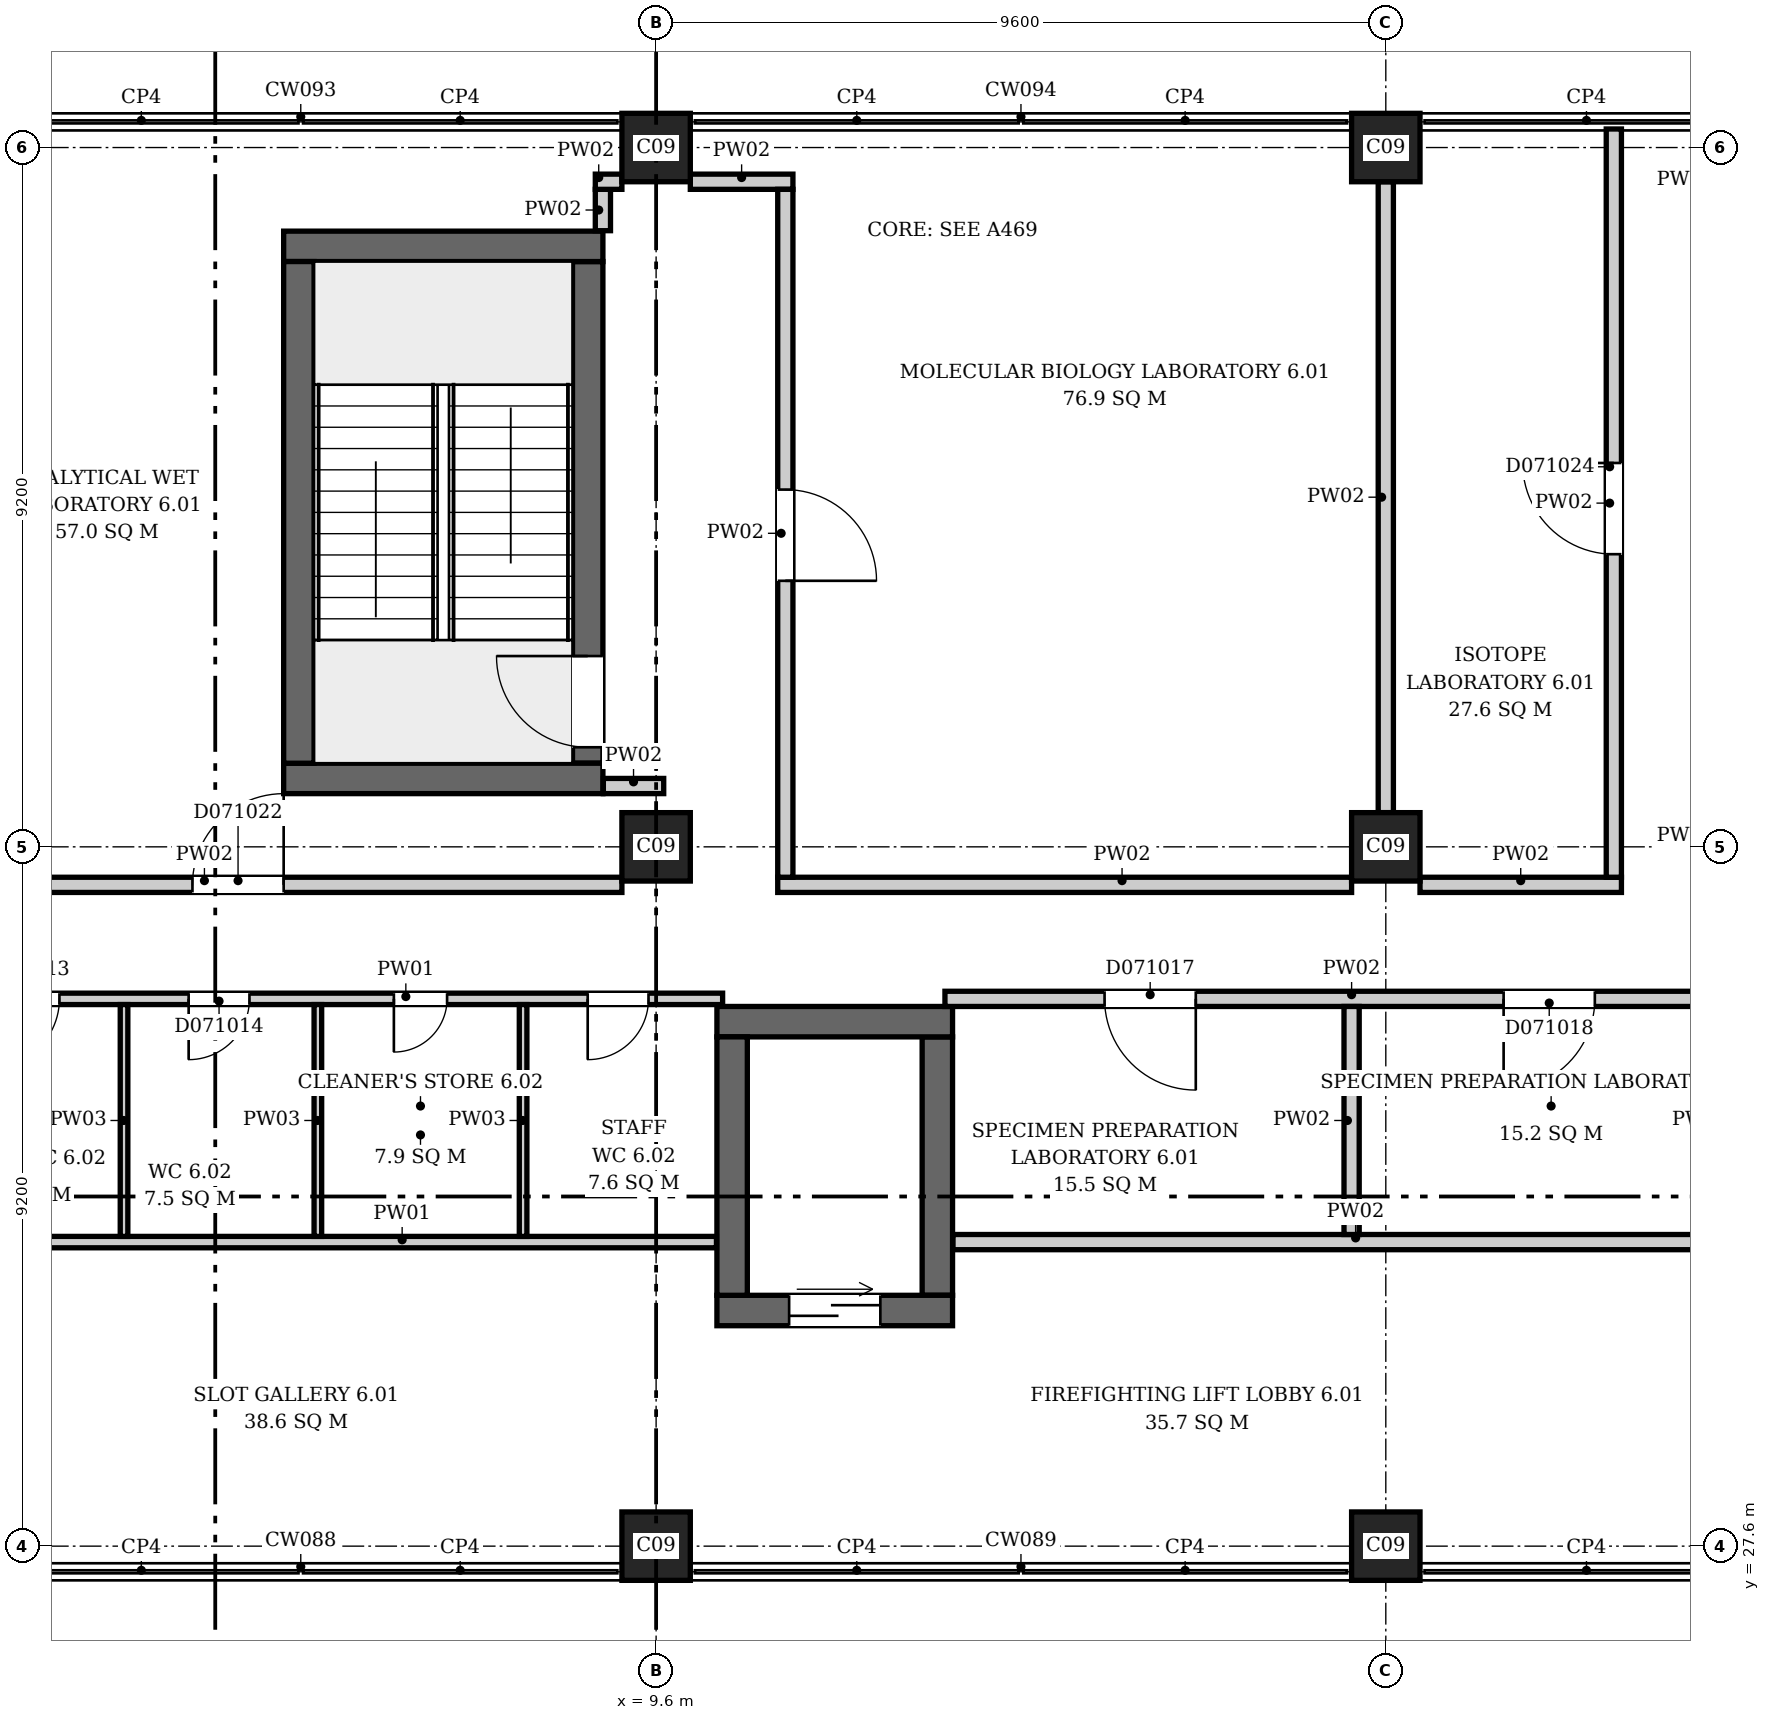
"""IFC4 building model, lengths in metres.
Left out: names, types, materials, properties, quantities, classifications, styles, units other than length and angle.
Written with IfcOpenShell. Run it as: python <this file> out.ifc"""

import sys

from ifc_helpers import new_model, si_unit, direction, frame, frame_2d, origin, origin_2d, place, context, subcontext, project, spatial, rectangle, extrude, element, fill, save


model = new_model("IFC4")
c1 = context("Model", 3, precision=1e-05, world=origin(), true_north=direction((0.0, 1.0)))
c2 = subcontext(c1, "Body", "Model", "MODEL_VIEW")
j1 = project(units=[si_unit("LENGTHUNIT", "METRE"), si_unit("PLANEANGLEUNIT", "RADIAN")], contexts=[c1])
p1 = place(None, origin())
s1 = spatial("IfcSite", under=j1, at=p1, CompositionType="ELEMENT")
p2 = place(p1, origin())
s2 = spatial("IfcBuilding", under=s1, at=p2, CompositionType="ELEMENT")
p3 = place(p2, frame((0.0, 0.0, 36.1)))
s3 = spatial("IfcBuildingStorey", under=s2, at=p3, CompositionType="ELEMENT", Elevation=36.1)
for number, where, z_axis, x_axis in (
    (1, (4.7, 37.7, 0.0), (0.0, 0.0, 1.0), (1.0, 0.0, 0.0)),
    (2, (4.7, 44.7, 0.0), (0.0, 0.0, 1.0), (1.0, 0.0, 0.0)),
):
    element("IfcWall", number, at=place(p3, frame(where, z_axis=z_axis, x_axis=x_axis)), inside=s3, PredefinedType="SHEAR", context=c2, shape_type="SweptSolid", body=[
        extrude(rectangle(XDim=4.2, YDim=0.4, at=frame_2d((2.1, 0.0))), origin(), (0.0, 0.0, 1.0), 4.2),
    ])
p4 = place(p3, frame((4.9, 37.9, 0.0), z_axis=(0.0, 0.0, 1.0), x_axis=(0.0, 1.0, 0.0)))
e3 = element("IfcWall", 3, at=p4, inside=s3, PredefinedType="SHEAR", context=c2, shape_type="SweptSolid", body=[
    extrude(rectangle(XDim=6.6, YDim=0.4, at=frame_2d((3.3, 0.0))), origin(), (0.0, 0.0, 1.0), 4.2),
])
p5 = place(p3, frame((8.7, 37.9, 0.0), z_axis=(0.0, 0.0, 1.0), x_axis=(0.0, 1.0, 0.0)))
e4 = element("IfcWall", 4, at=p5, inside=s3, PredefinedType="SHEAR", context=c2, shape_type="SweptSolid", body=[
    extrude(rectangle(XDim=6.6, YDim=0.4, at=frame_2d((3.3, 0.0))), origin(), (0.0, 0.0, 1.0), 4.2),
])
p6 = place(p5, frame((0.21, 0.0, 0.0)))
e5 = element("IfcOpeningElement", 5, at=p6, cuts=e4, PredefinedType="OPENING", context=c2, shape_type="SweptSolid", body=[
    extrude(rectangle(XDim=1.2, YDim=2.1, at=frame_2d((0.6, 1.05))), frame((0.0, 0.21, 0.0), z_axis=(0.0, -1.0, 0.0), x_axis=(1.0, 0.0, 0.0)), (0.0, 0.0, 1.0), 0.42),
])
p7 = place(p3, frame((10.4, 30.7, 0.0), z_axis=(0.0, 0.0, 1.0), x_axis=(1.0, 0.0, 0.0)))
e6 = element("IfcWall", 6, at=p7, inside=s3, PredefinedType="SHEAR", context=c2, shape_type="SweptSolid", body=[
    extrude(rectangle(XDim=3.1, YDim=0.4, at=frame_2d((1.55, 0.0))), origin(), (0.0, 0.0, 1.0), 4.2),
])
p8 = place(p7, frame((0.95, 0.0, 0.0)))
e7 = element("IfcOpeningElement", 7, at=p8, cuts=e6, PredefinedType="OPENING", context=c2, shape_type="SweptSolid", body=[
    extrude(rectangle(XDim=1.2, YDim=2.1, at=frame_2d((0.6, 1.05))), frame((0.0, 0.21, 0.0), z_axis=(0.0, -1.0, 0.0), x_axis=(1.0, 0.0, 0.0)), (0.0, 0.0, 1.0), 0.42),
])
p9 = place(p3, frame((10.4, 34.5, 0.0), z_axis=(0.0, 0.0, 1.0), x_axis=(1.0, 0.0, 0.0)))
e8 = element("IfcWall", 8, at=p9, inside=s3, PredefinedType="SHEAR", context=c2, shape_type="SweptSolid", body=[
    extrude(rectangle(XDim=3.1, YDim=0.4, at=frame_2d((1.55, 0.0))), origin(), (0.0, 0.0, 1.0), 4.2),
])
for number, where, z_axis, x_axis in (
    (9, (10.6, 30.9, 0.0), (0.0, 0.0, 1.0), (0.0, 1.0, 0.0)),
    (10, (13.3, 30.9, 0.0), (0.0, 0.0, 1.0), (0.0, 1.0, 0.0)),
):
    element("IfcWall", number, at=place(p3, frame(where, z_axis=z_axis, x_axis=x_axis)), inside=s3, PredefinedType="SHEAR", context=c2, shape_type="SweptSolid", body=[
        extrude(rectangle(XDim=3.4, YDim=0.4, at=frame_2d((1.7, 0.0))), origin(), (0.0, 0.0, 1.0), 4.2),
    ])
for number, where, z_axis, x_axis in (
    (11, (9.6, 27.6, 0.0), (0.0, 0.0, 1.0), (1.0, 0.0, 0.0)),
    (12, (19.2, 27.6, 0.0), (0.0, 0.0, 1.0), (1.0, 0.0, 0.0)),
    (13, (9.6, 36.8, 0.0), (0.0, 0.0, 1.0), (1.0, 0.0, 0.0)),
    (14, (19.2, 36.8, 0.0), (0.0, 0.0, 1.0), (1.0, 0.0, 0.0)),
    (15, (9.6, 46.0, 0.0), (0.0, 0.0, 1.0), (1.0, 0.0, 0.0)),
    (16, (19.2, 46.0, 0.0), (0.0, 0.0, 1.0), (1.0, 0.0, 0.0)),
):
    element("IfcColumn", number, at=place(p3, frame(where, z_axis=z_axis, x_axis=x_axis)), inside=s3, PredefinedType="COLUMN", context=c2, shape_type="SweptSolid", body=[
        extrude(rectangle(XDim=0.9, YDim=0.9, at=origin_2d()), origin(), (0.0, 0.0, 1.0), 4.2),
    ])
p10 = place(p3, frame((0.056, 31.6, 0.0), z_axis=(0.0, 0.0, 1.0), x_axis=(1.0, 0.0, 0.0)))
e17 = element("IfcWall", 17, at=p10, inside=s3, PredefinedType="PARTITIONING", context=c2, shape_type="SweptSolid", body=[
    extrude(rectangle(XDim=10.338, YDim=0.15, at=frame_2d((5.169, 0.0))), origin(), (0.0, 0.0, 1.0), 3.9),
])
p11 = place(p3, frame((0.056, 34.8, 0.0), z_axis=(0.0, 0.0, 1.0), x_axis=(1.0, 0.0, 0.0)))
e18 = element("IfcWall", 18, at=p11, inside=s3, PredefinedType="PARTITIONING", context=c2, shape_type="SweptSolid", body=[
    extrude(rectangle(XDim=10.419, YDim=0.15, at=frame_2d((5.209, 0.0))), origin(), (0.0, 0.0, 1.0), 3.9),
])
p12 = place(p11, frame((0.794, 0.0, 0.0)))
e19 = element("IfcOpeningElement", 19, at=p12, cuts=e18, PredefinedType="OPENING", context=c2, shape_type="SweptSolid", body=[
    extrude(rectangle(XDim=0.9, YDim=2.1, at=frame_2d((0.45, 1.05))), frame((0.0, 0.085, 0.0), z_axis=(0.0, -1.0, 0.0), x_axis=(1.0, 0.0, 0.0)), (0.0, 0.0, 1.0), 0.17),
])
p13 = place(p11, frame((3.394, 0.0, 0.0)))
e20 = element("IfcOpeningElement", 20, at=p13, cuts=e18, PredefinedType="OPENING", context=c2, shape_type="SweptSolid", body=[
    extrude(rectangle(XDim=0.8, YDim=2.1, at=frame_2d((0.4, 1.05))), frame((0.0, 0.085, 0.0), z_axis=(0.0, -1.0, 0.0), x_axis=(1.0, 0.0, 0.0)), (0.0, 0.0, 1.0), 0.17),
])
p14 = place(p11, frame((6.094, 0.0, 0.0)))
e21 = element("IfcOpeningElement", 21, at=p14, cuts=e18, PredefinedType="OPENING", context=c2, shape_type="SweptSolid", body=[
    extrude(rectangle(XDim=0.7, YDim=2.1, at=frame_2d((0.35, 1.05))), frame((0.0, 0.085, 0.0), z_axis=(0.0, -1.0, 0.0), x_axis=(1.0, 0.0, 0.0)), (0.0, 0.0, 1.0), 0.17),
])
p15 = place(p11, frame((8.644, 0.0, 0.0)))
e22 = element("IfcOpeningElement", 22, at=p15, cuts=e18, PredefinedType="OPENING", context=c2, shape_type="SweptSolid", body=[
    extrude(rectangle(XDim=0.8, YDim=2.1, at=frame_2d((0.4, 1.05))), frame((0.0, 0.085, 0.0), z_axis=(0.0, -1.0, 0.0), x_axis=(1.0, 0.0, 0.0)), (0.0, 0.0, 1.0), 0.17),
])
p16 = place(p3, frame((0.7, 36.3, 0.0), z_axis=(0.0, 0.0, 1.0), x_axis=(1.0, 0.0, 0.0)))
e23 = element("IfcWall", 23, at=p16, inside=s3, PredefinedType="PARTITIONING", context=c2, shape_type="SweptSolid", body=[
    extrude(rectangle(XDim=8.45, YDim=0.2, at=frame_2d((4.225, 0.0))), origin(), (0.0, 0.0, 1.0), 3.9),
])
p17 = place(p16, frame((2.8, 0.0, 0.0)))
e24 = element("IfcOpeningElement", 24, at=p17, cuts=e23, PredefinedType="OPENING", context=c2, shape_type="SweptSolid", body=[
    extrude(rectangle(XDim=1.2, YDim=2.1, at=frame_2d((0.6, 1.05))), frame((0.0, 0.11, 0.0), z_axis=(0.0, -1.0, 0.0), x_axis=(1.0, 0.0, 0.0)), (0.0, 0.0, 1.0), 0.22),
])
for number, where, z_axis, x_axis in (
    (25, (2.6, 31.675, 0.0), (0.0, 0.0, 1.0), (0.0, 1.0, 0.0)),
    (26, (5.15, 31.675, 0.0), (0.0, 0.0, 1.0), (0.0, 1.0, 0.0)),
    (27, (7.85, 31.675, 0.0), (0.0, 0.0, 1.0), (0.0, 1.0, 0.0)),
):
    element("IfcWall", number, at=place(p3, frame(where, z_axis=z_axis, x_axis=x_axis)), inside=s3, PredefinedType="PARTITIONING", context=c2, shape_type="SweptSolid", body=[
        extrude(rectangle(XDim=3.05, YDim=0.1, at=frame_2d((1.525, 0.0))), origin(), (0.0, 0.0, 1.0), 3.9),
    ])
p18 = place(p3, frame((8.9, 44.906, 0.0), z_axis=(0.0, 0.0, 1.0), x_axis=(0.0, 1.0, 0.0)))
e28 = element("IfcWall", 28, at=p18, inside=s3, PredefinedType="PARTITIONING", context=c2, shape_type="SweptSolid", body=[
    extrude(rectangle(XDim=0.544, YDim=0.2, at=frame_2d((0.272, 0.0))), origin(), (0.0, 0.0, 1.0), 3.9),
])
p19 = place(p3, frame((8.8, 45.55, 0.0), z_axis=(0.0, 0.0, 1.0), x_axis=(1.0, 0.0, 0.0)))
e29 = element("IfcWall", 29, at=p19, inside=s3, PredefinedType="PARTITIONING", context=c2, shape_type="SweptSolid", body=[
    extrude(rectangle(XDim=0.35, YDim=0.2, at=frame_2d((0.175, 0.0))), origin(), (0.0, 0.0, 1.0), 3.9),
])
p20 = place(p3, frame((8.906, 37.6, 0.0), z_axis=(0.0, 0.0, 1.0), x_axis=(1.0, 0.0, 0.0)))
e30 = element("IfcWall", 30, at=p20, inside=s3, PredefinedType="PARTITIONING", context=c2, shape_type="SweptSolid", body=[
    extrude(rectangle(XDim=0.794, YDim=0.2, at=frame_2d((0.397, 0.0))), origin(), (0.0, 0.0, 1.0), 3.9),
])
p21 = place(p3, frame((10.05, 45.55, 0.0), z_axis=(0.0, 0.0, 1.0), x_axis=(1.0, 0.0, 0.0)))
e31 = element("IfcWall", 31, at=p21, inside=s3, PredefinedType="PARTITIONING", context=c2, shape_type="SweptSolid", body=[
    extrude(rectangle(XDim=1.35, YDim=0.2, at=frame_2d((0.675, 0.0))), origin(), (0.0, 0.0, 1.0), 3.9),
])
p22 = place(p3, frame((11.2, 36.3, 0.0), z_axis=(0.0, 0.0, 1.0), x_axis=(1.0, 0.0, 0.0)))
e32 = element("IfcWall", 32, at=p22, inside=s3, PredefinedType="PARTITIONING", context=c2, shape_type="SweptSolid", body=[
    extrude(rectangle(XDim=7.55, YDim=0.2, at=frame_2d((3.775, 0.0))), origin(), (0.0, 0.0, 1.0), 3.9),
])
p23 = place(p3, frame((11.3, 36.4, 0.0), z_axis=(0.0, 0.0, 1.0), x_axis=(0.0, 1.0, 0.0)))
e33 = element("IfcWall", 33, at=p23, inside=s3, PredefinedType="PARTITIONING", context=c2, shape_type="SweptSolid", body=[
    extrude(rectangle(XDim=9.05, YDim=0.2, at=frame_2d((4.525, 0.0))), origin(), (0.0, 0.0, 1.0), 3.9),
])
p24 = place(p23, frame((3.9, 0.0, 0.0)))
e34 = element("IfcOpeningElement", 34, at=p24, cuts=e33, PredefinedType="OPENING", context=c2, shape_type="SweptSolid", body=[
    extrude(rectangle(XDim=1.2, YDim=2.1, at=frame_2d((0.6, 1.05))), frame((0.0, 0.11, 0.0), z_axis=(0.0, -1.0, 0.0), x_axis=(1.0, 0.0, 0.0)), (0.0, 0.0, 1.0), 0.22),
])
p25 = place(p3, frame((13.4, 34.8, 0.0), z_axis=(0.0, 0.0, 1.0), x_axis=(1.0, 0.0, 0.0)))
e35 = element("IfcWall", 35, at=p25, inside=s3, PredefinedType="PARTITIONING", context=c2, shape_type="SweptSolid", body=[
    extrude(rectangle(XDim=10.7, YDim=0.2, at=frame_2d((5.35, 0.0))), origin(), (0.0, 0.0, 1.0), 3.9),
])
p26 = place(p25, frame((2.1, 0.0, 0.0)))
e36 = element("IfcOpeningElement", 36, at=p26, cuts=e35, PredefinedType="OPENING", context=c2, shape_type="SweptSolid", body=[
    extrude(rectangle(XDim=1.2, YDim=2.1, at=frame_2d((0.6, 1.05))), frame((0.0, 0.11, 0.0), z_axis=(0.0, -1.0, 0.0), x_axis=(1.0, 0.0, 0.0)), (0.0, 0.0, 1.0), 0.22),
])
p27 = place(p25, frame((7.35, 0.0, 0.0)))
e37 = element("IfcOpeningElement", 37, at=p27, cuts=e35, PredefinedType="OPENING", context=c2, shape_type="SweptSolid", body=[
    extrude(rectangle(XDim=1.2, YDim=2.1, at=frame_2d((0.6, 1.05))), frame((0.0, 0.11, 0.0), z_axis=(0.0, -1.0, 0.0), x_axis=(1.0, 0.0, 0.0)), (0.0, 0.0, 1.0), 0.22),
])
p28 = place(p3, frame((13.506, 31.6, 0.0), z_axis=(0.0, 0.0, 1.0), x_axis=(1.0, 0.0, 0.0)))
e38 = element("IfcWall", 38, at=p28, inside=s3, PredefinedType="PARTITIONING", context=c2, shape_type="SweptSolid", body=[
    extrude(rectangle(XDim=10.594, YDim=0.2, at=frame_2d((5.297, 0.0))), origin(), (0.0, 0.0, 1.0), 3.9),
])
p29 = place(p3, frame((18.75, 31.7, 0.0), z_axis=(0.0, 0.0, 1.0), x_axis=(0.0, 1.0, 0.0)))
e39 = element("IfcWall", 39, at=p29, inside=s3, PredefinedType="PARTITIONING", context=c2, shape_type="SweptSolid", body=[
    extrude(rectangle(XDim=3.0, YDim=0.2, at=frame_2d((1.5, 0.0))), origin(), (0.0, 0.0, 1.0), 3.9),
])
p30 = place(p3, frame((19.2, 37.25, 0.0), z_axis=(0.0, 0.0, 1.0), x_axis=(0.0, 1.0, 0.0)))
e40 = element("IfcWall", 40, at=p30, inside=s3, PredefinedType="PARTITIONING", context=c2, shape_type="SweptSolid", body=[
    extrude(rectangle(XDim=8.3, YDim=0.2, at=frame_2d((4.15, 0.0))), origin(), (0.0, 0.0, 1.0), 3.9),
])
p31 = place(p3, frame((19.65, 36.3, 0.0), z_axis=(0.0, 0.0, 1.0), x_axis=(1.0, 0.0, 0.0)))
e41 = element("IfcWall", 41, at=p31, inside=s3, PredefinedType="PARTITIONING", context=c2, shape_type="SweptSolid", body=[
    extrude(rectangle(XDim=2.65, YDim=0.2, at=frame_2d((1.325, 0.0))), origin(), (0.0, 0.0, 1.0), 3.9),
])
p32 = place(p3, frame((22.2, 36.4, 0.0), z_axis=(0.0, 0.0, 1.0), x_axis=(0.0, 1.0, 0.0)))
e42 = element("IfcWall", 42, at=p32, inside=s3, PredefinedType="PARTITIONING", context=c2, shape_type="SweptSolid", body=[
    extrude(rectangle(XDim=9.844, YDim=0.2, at=frame_2d((4.922, 0.0))), origin(), (0.0, 0.0, 1.0), 3.9),
])
p33 = place(p32, frame((4.25, 0.0, 0.0)))
e43 = element("IfcOpeningElement", 43, at=p33, cuts=e42, PredefinedType="OPENING", context=c2, shape_type="SweptSolid", body=[
    extrude(rectangle(XDim=1.2, YDim=2.1, at=frame_2d((0.6, 1.05))), frame((0.0, 0.11, 0.0), z_axis=(0.0, -1.0, 0.0), x_axis=(1.0, 0.0, 0.0)), (0.0, 0.0, 1.0), 0.22),
])
p34 = place(p6, origin())
e44 = element("IfcDoor", 44, at=p34, inside=s3, OperationType="SINGLE_SWING_RIGHT", PredefinedType="DOOR", context=c2, shape_type="SweptSolid", body=[
    extrude(rectangle(XDim=1.2, YDim=2.1, at=frame_2d((0.6, 1.05))), frame((0.0, 0.025, 0.0), z_axis=(0.0, -1.0, 0.0), x_axis=(1.0, 0.0, 0.0)), (0.0, 0.0, 1.0), 0.05),
])
fill(e5, e44)
p35 = place(p8, origin())
e45 = element("IfcDoor", 45, at=p35, inside=s3, OperationType="DOUBLE_DOOR_SLIDING", PredefinedType="DOOR", context=c2, shape_type="SweptSolid", body=[
    extrude(rectangle(XDim=1.2, YDim=2.1, at=frame_2d((0.6, 1.05))), frame((0.0, 0.025, 0.0), z_axis=(0.0, -1.0, 0.0), x_axis=(1.0, 0.0, 0.0)), (0.0, 0.0, 1.0), 0.05),
])
fill(e7, e45)
p36 = place(p12, origin())
e46 = element("IfcDoor", 46, at=p36, inside=s3, OperationType="SINGLE_SWING_LEFT", PredefinedType="DOOR", context=c2, shape_type="SweptSolid", body=[
    extrude(rectangle(XDim=0.9, YDim=2.1, at=frame_2d((0.45, 1.05))), frame((0.0, 0.025, 0.0), z_axis=(0.0, -1.0, 0.0), x_axis=(1.0, 0.0, 0.0)), (0.0, 0.0, 1.0), 0.05),
])
fill(e19, e46)
p37 = place(p13, origin())
e47 = element("IfcDoor", 47, at=p37, inside=s3, OperationType="SINGLE_SWING_LEFT", PredefinedType="DOOR", context=c2, shape_type="SweptSolid", body=[
    extrude(rectangle(XDim=0.8, YDim=2.1, at=frame_2d((0.4, 1.05))), frame((0.0, 0.025, 0.0), z_axis=(0.0, -1.0, 0.0), x_axis=(1.0, 0.0, 0.0)), (0.0, 0.0, 1.0), 0.05),
])
fill(e20, e47)
p38 = place(p14, origin())
e48 = element("IfcDoor", 48, at=p38, inside=s3, OperationType="SINGLE_SWING_LEFT", PredefinedType="DOOR", context=c2, shape_type="SweptSolid", body=[
    extrude(rectangle(XDim=0.7, YDim=2.1, at=frame_2d((0.35, 1.05))), frame((0.0, 0.025, 0.0), z_axis=(0.0, -1.0, 0.0), x_axis=(1.0, 0.0, 0.0)), (0.0, 0.0, 1.0), 0.05),
])
fill(e21, e48)
p39 = place(p15, origin())
e49 = element("IfcDoor", 49, at=p39, inside=s3, OperationType="SINGLE_SWING_LEFT", PredefinedType="DOOR", context=c2, shape_type="SweptSolid", body=[
    extrude(rectangle(XDim=0.8, YDim=2.1, at=frame_2d((0.4, 1.05))), frame((0.0, 0.025, 0.0), z_axis=(0.0, -1.0, 0.0), x_axis=(1.0, 0.0, 0.0)), (0.0, 0.0, 1.0), 0.05),
])
fill(e22, e49)
p40 = place(p26, origin())
e50 = element("IfcDoor", 50, at=p40, inside=s3, OperationType="SINGLE_SWING_RIGHT", PredefinedType="DOOR", context=c2, shape_type="SweptSolid", body=[
    extrude(rectangle(XDim=1.2, YDim=2.1, at=frame_2d((0.6, 1.05))), frame((0.0, 0.025, 0.0), z_axis=(0.0, -1.0, 0.0), x_axis=(1.0, 0.0, 0.0)), (0.0, 0.0, 1.0), 0.05),
])
fill(e36, e50)
p41 = place(p27, origin())
e51 = element("IfcDoor", 51, at=p41, inside=s3, OperationType="SINGLE_SWING_LEFT", PredefinedType="DOOR", context=c2, shape_type="SweptSolid", body=[
    extrude(rectangle(XDim=1.2, YDim=2.1, at=frame_2d((0.6, 1.05))), frame((0.0, 0.025, 0.0), z_axis=(0.0, -1.0, 0.0), x_axis=(1.0, 0.0, 0.0)), (0.0, 0.0, 1.0), 0.05),
])
fill(e37, e51)
p42 = place(p17, origin())
e52 = element("IfcDoor", 52, at=p42, inside=s3, OperationType="SINGLE_SWING_RIGHT", PredefinedType="DOOR", context=c2, shape_type="SweptSolid", body=[
    extrude(rectangle(XDim=1.2, YDim=2.1, at=frame_2d((0.6, 1.05))), frame((0.0, 0.025, 0.0), z_axis=(0.0, -1.0, 0.0), x_axis=(1.0, 0.0, 0.0)), (0.0, 0.0, 1.0), 0.05),
])
fill(e24, e52)
p43 = place(p24, origin())
e53 = element("IfcDoor", 53, at=p43, inside=s3, OperationType="SINGLE_SWING_LEFT", PredefinedType="DOOR", context=c2, shape_type="SweptSolid", body=[
    extrude(rectangle(XDim=1.2, YDim=2.1, at=frame_2d((0.6, 1.05))), frame((0.0, 0.025, 0.0), z_axis=(0.0, -1.0, 0.0), x_axis=(1.0, 0.0, 0.0)), (0.0, 0.0, 1.0), 0.05),
])
fill(e34, e53)
p44 = place(p33, origin())
e54 = element("IfcDoor", 54, at=p44, inside=s3, OperationType="SINGLE_SWING_RIGHT", PredefinedType="DOOR", context=c2, shape_type="SweptSolid", body=[
    extrude(rectangle(XDim=1.2, YDim=2.1, at=frame_2d((0.6, 1.05))), frame((0.0, 0.025, 0.0), z_axis=(0.0, -1.0, 0.0), x_axis=(1.0, 0.0, 0.0)), (0.0, 0.0, 1.0), 0.05),
])
fill(e43, e54)
save(model, sys.argv[1])
